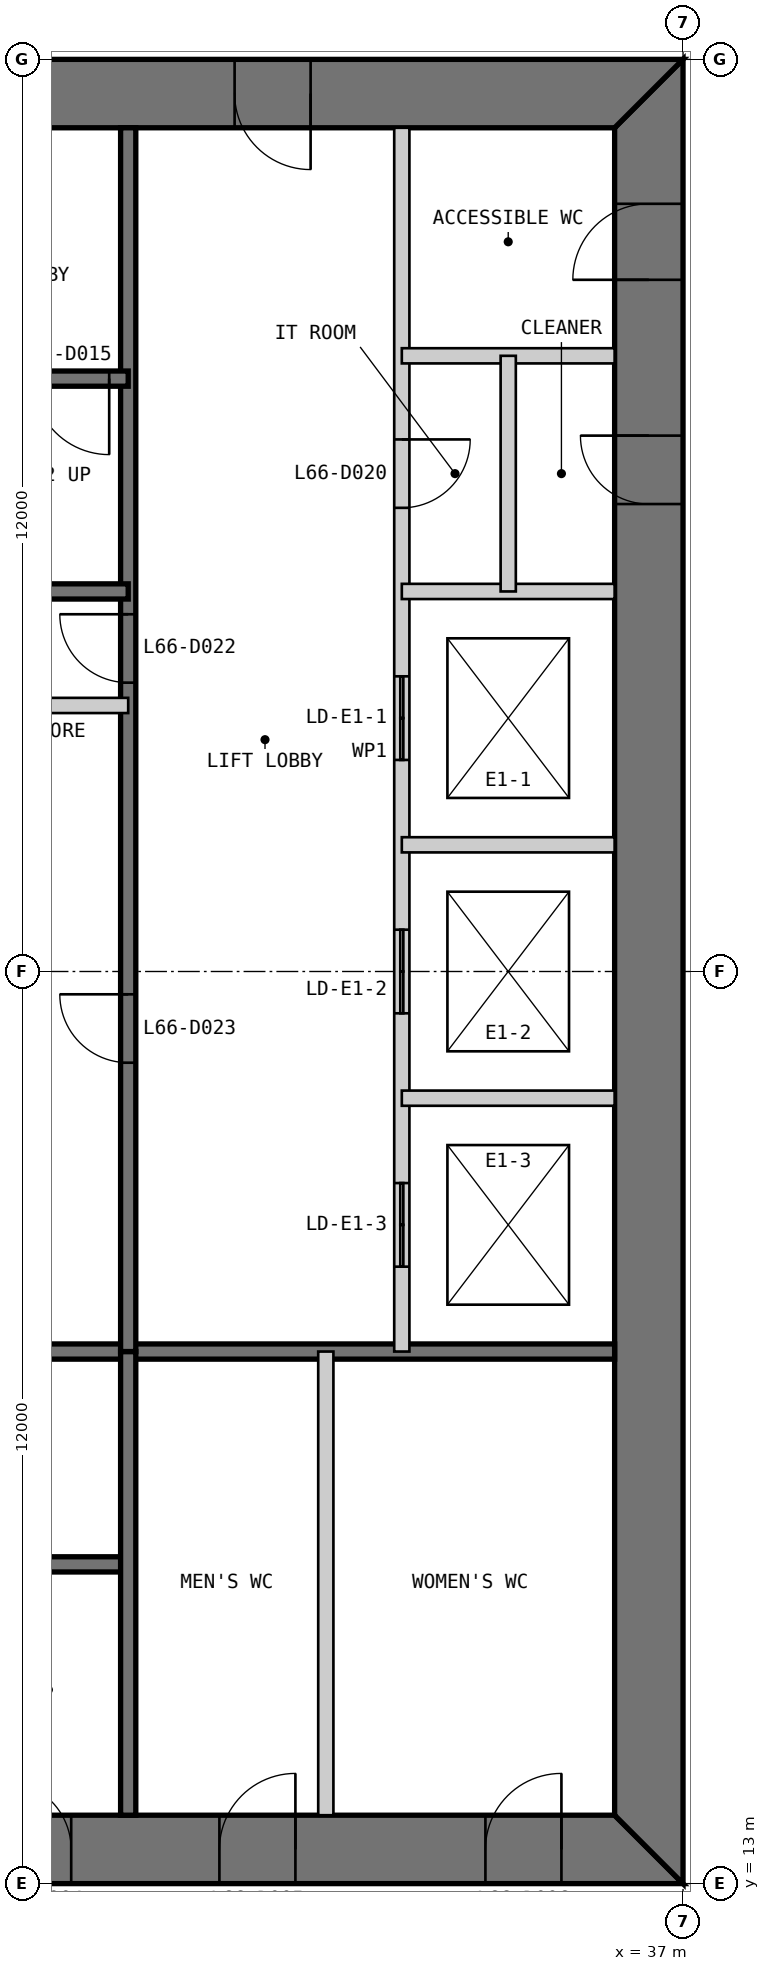
"""IFC4 building model, lengths in metres.
Left out: names, types, materials, properties, quantities, classifications, styles, units other than length and angle.
Written with IfcOpenShell. Run it as: python <this file> out.ifc"""

import sys

from ifc_helpers import new_model, si_unit, direction, frame, frame_2d, origin, place, context, subcontext, project, spatial, polyline, rectangle, outline, extrude, element, fill, save


model = new_model("IFC4")
c1 = context("Model", 3, precision=1e-05, world=origin(), true_north=direction((0.0, 1.0)))
c2 = subcontext(c1, "Body", "Model", "MODEL_VIEW")
j1 = project(units=[si_unit("LENGTHUNIT", "METRE"), si_unit("PLANEANGLEUNIT", "RADIAN")], contexts=[c1])
p1 = place(None, origin())
s1 = spatial("IfcSite", under=j1, at=p1, CompositionType="ELEMENT")
p2 = place(p1, origin())
s2 = spatial("IfcBuilding", under=s1, at=p2, CompositionType="ELEMENT")
p3 = place(p2, frame((0.0, 0.0, 276.4)))
s3 = spatial("IfcBuildingStorey", under=s2, at=p3, CompositionType="ELEMENT", Elevation=276.4)
p4 = place(p3, frame((13.0, 13.45, 0.0), z_axis=(0.0, 0.0, 1.0), x_axis=(1.0, 0.0, 0.0)))
e1 = element("IfcWall", 1, at=p4, inside=s3, PredefinedType="SHEAR", context=c2, shape_type="SweptSolid", body=[
    extrude(outline(polyline([(0.0, -0.45), (24.0, -0.45), (23.1, 0.45), (0.9, 0.45), (0.0, -0.45)])), origin(), (0.0, 0.0, 1.0), 3.4),
])
p5 = place(p4, frame((4.9, 0.0, 0.0)))
e2 = element("IfcOpeningElement", 2, at=p5, cuts=e1, PredefinedType="OPENING", context=c2, shape_type="SweptSolid", body=[
    extrude(rectangle(XDim=1.0, YDim=2.2, at=frame_2d((0.5, 1.1))), frame((0.0, 0.46, 0.0), z_axis=(0.0, -1.0, 0.0), x_axis=(1.0, 0.0, 0.0)), (0.0, 0.0, 1.0), 0.92),
])
p6 = place(p4, frame((8.9, 0.0, 0.0)))
e3 = element("IfcOpeningElement", 3, at=p6, cuts=e1, PredefinedType="OPENING", context=c2, shape_type="SweptSolid", body=[
    extrude(rectangle(XDim=1.1, YDim=2.2, at=frame_2d((0.55, 1.1))), frame((0.0, 0.46, 0.0), z_axis=(0.0, -1.0, 0.0), x_axis=(1.0, 0.0, 0.0)), (0.0, 0.0, 1.0), 0.92),
])
p7 = place(p4, frame((15.05, 0.0, 0.0)))
e4 = element("IfcOpeningElement", 4, at=p7, cuts=e1, PredefinedType="OPENING", context=c2, shape_type="SweptSolid", body=[
    extrude(rectangle(XDim=0.9, YDim=2.2, at=frame_2d((0.45, 1.1))), frame((0.0, 0.46, 0.0), z_axis=(0.0, -1.0, 0.0), x_axis=(1.0, 0.0, 0.0)), (0.0, 0.0, 1.0), 0.92),
])
p8 = place(p4, frame((17.9, 0.0, 0.0)))
e5 = element("IfcOpeningElement", 5, at=p8, cuts=e1, PredefinedType="OPENING", context=c2, shape_type="SweptSolid", body=[
    extrude(rectangle(XDim=1.0, YDim=2.2, at=frame_2d((0.5, 1.1))), frame((0.0, 0.46, 0.0), z_axis=(0.0, -1.0, 0.0), x_axis=(1.0, 0.0, 0.0)), (0.0, 0.0, 1.0), 0.92),
])
p9 = place(p4, frame((21.4, 0.0, 0.0)))
e6 = element("IfcOpeningElement", 6, at=p9, cuts=e1, PredefinedType="OPENING", context=c2, shape_type="SweptSolid", body=[
    extrude(rectangle(XDim=1.0, YDim=2.2, at=frame_2d((0.5, 1.1))), frame((0.0, 0.46, 0.0), z_axis=(0.0, -1.0, 0.0), x_axis=(1.0, 0.0, 0.0)), (0.0, 0.0, 1.0), 0.92),
])
p10 = place(p3, frame((36.55, 13.9, 0.0), z_axis=(0.0, 0.0, 1.0), x_axis=(0.0, 1.0, 0.0)))
e7 = element("IfcWall", 7, at=p10, inside=s3, PredefinedType="SHEAR", context=c2, shape_type="SweptSolid", body=[
    extrude(outline(polyline([(-0.9, -0.45), (23.1, -0.45), (22.2, 0.45), (0.0, 0.45), (-0.9, -0.45)])), origin(), (0.0, 0.0, 1.0), 3.4),
])
p11 = place(p10, frame((20.2, 0.0, 0.0)))
e8 = element("IfcOpeningElement", 8, at=p11, cuts=e7, PredefinedType="OPENING", context=c2, shape_type="SweptSolid", body=[
    extrude(rectangle(XDim=1.0, YDim=2.2, at=frame_2d((0.5, 1.1))), frame((0.0, 0.46, 0.0), z_axis=(0.0, -1.0, 0.0), x_axis=(1.0, 0.0, 0.0)), (0.0, 0.0, 1.0), 0.92),
])
p12 = place(p10, frame((17.25, 0.0, 0.0)))
e9 = element("IfcOpeningElement", 9, at=p12, cuts=e7, PredefinedType="OPENING", context=c2, shape_type="SweptSolid", body=[
    extrude(rectangle(XDim=0.9, YDim=2.2, at=frame_2d((0.45, 1.1))), frame((0.0, 0.46, 0.0), z_axis=(0.0, -1.0, 0.0), x_axis=(1.0, 0.0, 0.0)), (0.0, 0.0, 1.0), 0.92),
])
p13 = place(p3, frame((37.0, 36.55, 0.0), z_axis=(0.0, 0.0, 1.0), x_axis=(-1.0, 0.0, 0.0)))
e10 = element("IfcWall", 10, at=p13, inside=s3, PredefinedType="SHEAR", context=c2, shape_type="SweptSolid", body=[
    extrude(outline(polyline([(0.0, -0.45), (24.0, -0.45), (23.1, 0.45), (0.9, 0.45), (0.0, -0.45)])), origin(), (0.0, 0.0, 1.0), 3.4),
])
p14 = place(p13, frame((4.9, 0.0, 0.0)))
e11 = element("IfcOpeningElement", 11, at=p14, cuts=e10, PredefinedType="OPENING", context=c2, shape_type="SweptSolid", body=[
    extrude(rectangle(XDim=1.0, YDim=2.2, at=frame_2d((0.5, 1.1))), frame((0.0, 0.46, 0.0), z_axis=(0.0, -1.0, 0.0), x_axis=(1.0, 0.0, 0.0)), (0.0, 0.0, 1.0), 0.92),
])
p15 = place(p13, frame((8.9, 0.0, 0.0)))
e12 = element("IfcOpeningElement", 12, at=p15, cuts=e10, PredefinedType="OPENING", context=c2, shape_type="SweptSolid", body=[
    extrude(rectangle(XDim=1.1, YDim=2.2, at=frame_2d((0.55, 1.1))), frame((0.0, 0.46, 0.0), z_axis=(0.0, -1.0, 0.0), x_axis=(1.0, 0.0, 0.0)), (0.0, 0.0, 1.0), 0.92),
])
p16 = place(p13, frame((15.05, 0.0, 0.0)))
e13 = element("IfcOpeningElement", 13, at=p16, cuts=e10, PredefinedType="OPENING", context=c2, shape_type="SweptSolid", body=[
    extrude(rectangle(XDim=0.9, YDim=2.2, at=frame_2d((0.45, 1.1))), frame((0.0, 0.46, 0.0), z_axis=(0.0, -1.0, 0.0), x_axis=(1.0, 0.0, 0.0)), (0.0, 0.0, 1.0), 0.92),
])
p17 = place(p13, frame((17.9, 0.0, 0.0)))
e14 = element("IfcOpeningElement", 14, at=p17, cuts=e10, PredefinedType="OPENING", context=c2, shape_type="SweptSolid", body=[
    extrude(rectangle(XDim=1.0, YDim=2.2, at=frame_2d((0.5, 1.1))), frame((0.0, 0.46, 0.0), z_axis=(0.0, -1.0, 0.0), x_axis=(1.0, 0.0, 0.0)), (0.0, 0.0, 1.0), 0.92),
])
p18 = place(p13, frame((21.4, 0.0, 0.0)))
e15 = element("IfcOpeningElement", 15, at=p18, cuts=e10, PredefinedType="OPENING", context=c2, shape_type="SweptSolid", body=[
    extrude(rectangle(XDim=1.0, YDim=2.2, at=frame_2d((0.5, 1.1))), frame((0.0, 0.46, 0.0), z_axis=(0.0, -1.0, 0.0), x_axis=(1.0, 0.0, 0.0)), (0.0, 0.0, 1.0), 0.92),
])
p19 = place(p3, frame((20.3, 17.2, 0.0), z_axis=(0.0, 0.0, 1.0), x_axis=(1.0, 0.0, 0.0)))
e16 = element("IfcWall", 16, at=p19, inside=s3, PredefinedType="SOLIDWALL", context=c2, shape_type="SweptSolid", body=[
    extrude(rectangle(XDim=9.4, YDim=0.2, at=frame_2d((4.7, 0.0))), origin(), (0.0, 0.0, 1.0), 3.2),
])
p20 = place(p19, frame((0.25, 0.0, 0.0)))
e17 = element("IfcOpeningElement", 17, at=p20, cuts=e16, PredefinedType="OPENING", context=c2, shape_type="SweptSolid", body=[
    extrude(rectangle(XDim=1.0, YDim=2.2, at=frame_2d((0.5, 1.1))), frame((0.0, 0.11, 0.0), z_axis=(0.0, -1.0, 0.0), x_axis=(1.0, 0.0, 0.0)), (0.0, 0.0, 1.0), 0.22),
])
p21 = place(p3, frame((20.3, 20.0, 0.0), z_axis=(0.0, 0.0, 1.0), x_axis=(1.0, 0.0, 0.0)))
e18 = element("IfcWall", 18, at=p21, inside=s3, PredefinedType="SOLIDWALL", context=c2, shape_type="SweptSolid", body=[
    extrude(rectangle(XDim=15.8, YDim=0.2, at=frame_2d((7.9, 0.0))), origin(), (0.0, 0.0, 1.0), 3.2),
])
p22 = place(p3, frame((29.7, 13.9, 0.0), z_axis=(0.0, 0.0, 1.0), x_axis=(0.0, 1.0, 0.0)))
e19 = element("IfcWall", 19, at=p22, inside=s3, PredefinedType="SOLIDWALL", context=c2, shape_type="SweptSolid", body=[
    extrude(rectangle(XDim=6.1, YDim=0.2, at=frame_2d((3.05, 0.0))), origin(), (0.0, 0.0, 1.0), 3.2),
])
p23 = place(p3, frame((32.3, 13.9, 0.0), z_axis=(0.0, 0.0, 1.0), x_axis=(0.0, 1.0, 0.0)))
e20 = element("IfcWall", 20, at=p23, inside=s3, PredefinedType="PARTITIONING", context=c2, shape_type="SweptSolid", body=[
    extrude(rectangle(XDim=6.1, YDim=0.2, at=frame_2d((3.05, 0.0))), origin(), (0.0, 0.0, 1.0), 3.2),
])
p24 = place(p3, frame((33.3, 36.1, 0.0), z_axis=(0.0, 0.0, 1.0), x_axis=(0.0, -1.0, 0.0)))
e21 = element("IfcWall", 21, at=p24, inside=s3, PredefinedType="PARTITIONING", context=c2, shape_type="SweptSolid", body=[
    extrude(rectangle(XDim=16.1, YDim=0.2, at=frame_2d((8.05, 0.0))), origin(), (0.0, 0.0, 1.0), 3.2),
])
p25 = place(p24, frame((4.1, 0.0, 0.0)))
e22 = element("IfcOpeningElement", 22, at=p25, cuts=e21, PredefinedType="OPENING", context=c2, shape_type="SweptSolid", body=[
    extrude(rectangle(XDim=0.9, YDim=2.2, at=frame_2d((0.45, 1.1))), frame((0.0, 0.11, 0.0), z_axis=(0.0, -1.0, 0.0), x_axis=(1.0, 0.0, 0.0)), (0.0, 0.0, 1.0), 0.22),
])
p26 = place(p24, frame((7.217, 0.0, 0.0)))
e23 = element("IfcOpeningElement", 23, at=p26, cuts=e21, PredefinedType="OPENING", context=c2, shape_type="SweptSolid", body=[
    extrude(rectangle(XDim=1.1, YDim=2.2, at=frame_2d((0.55, 1.1))), frame((0.0, 0.11, 0.0), z_axis=(0.0, -1.0, 0.0), x_axis=(1.0, 0.0, 0.0)), (0.0, 0.0, 1.0), 0.22),
])
p27 = place(p24, frame((10.55, 0.0, 0.0)))
e24 = element("IfcOpeningElement", 24, at=p27, cuts=e21, PredefinedType="OPENING", context=c2, shape_type="SweptSolid", body=[
    extrude(rectangle(XDim=1.1, YDim=2.2, at=frame_2d((0.55, 1.1))), frame((0.0, 0.11, 0.0), z_axis=(0.0, -1.0, 0.0), x_axis=(1.0, 0.0, 0.0)), (0.0, 0.0, 1.0), 0.22),
])
p28 = place(p24, frame((13.883, 0.0, 0.0)))
e25 = element("IfcOpeningElement", 25, at=p28, cuts=e21, PredefinedType="OPENING", context=c2, shape_type="SweptSolid", body=[
    extrude(rectangle(XDim=1.1, YDim=2.2, at=frame_2d((0.55, 1.1))), frame((0.0, 0.11, 0.0), z_axis=(0.0, -1.0, 0.0), x_axis=(1.0, 0.0, 0.0)), (0.0, 0.0, 1.0), 0.22),
])
p29 = place(p3, frame((29.7, 36.1, 0.0), z_axis=(0.0, 0.0, 1.0), x_axis=(0.0, -1.0, 0.0)))
e26 = element("IfcWall", 26, at=p29, inside=s3, PredefinedType="SOLIDWALL", context=c2, shape_type="SweptSolid", body=[
    extrude(rectangle(XDim=16.1, YDim=0.2, at=frame_2d((8.05, 0.0))), origin(), (0.0, 0.0, 1.0), 3.2),
])
p30 = place(p29, frame((6.4, 0.0, 0.0)))
e27 = element("IfcOpeningElement", 27, at=p30, cuts=e26, PredefinedType="OPENING", context=c2, shape_type="SweptSolid", body=[
    extrude(rectangle(XDim=0.9, YDim=2.2, at=frame_2d((0.45, 1.1))), frame((0.0, 0.11, 0.0), z_axis=(0.0, -1.0, 0.0), x_axis=(1.0, 0.0, 0.0)), (0.0, 0.0, 1.0), 0.22),
])
p31 = place(p29, frame((11.4, 0.0, 0.0)))
e28 = element("IfcOpeningElement", 28, at=p31, cuts=e26, PredefinedType="OPENING", context=c2, shape_type="SweptSolid", body=[
    extrude(rectangle(XDim=0.9, YDim=2.2, at=frame_2d((0.45, 1.1))), frame((0.0, 0.11, 0.0), z_axis=(0.0, -1.0, 0.0), x_axis=(1.0, 0.0, 0.0)), (0.0, 0.0, 1.0), 0.22),
])
for number, where, z_axis, x_axis in (
    (29, (36.1, 30.0, 0.0), (0.0, 0.0, 1.0), (-1.0, 0.0, 0.0)),
    (30, (36.1, 26.667, 0.0), (0.0, 0.0, 1.0), (-1.0, 0.0, 0.0)),
    (31, (36.1, 23.333, 0.0), (0.0, 0.0, 1.0), (-1.0, 0.0, 0.0)),
):
    element("IfcWall", number, at=place(p3, frame(where, z_axis=z_axis, x_axis=x_axis)), inside=s3, PredefinedType="PARTITIONING", context=c2, shape_type="SweptSolid", body=[
        extrude(rectangle(XDim=2.8, YDim=0.2, at=frame_2d((1.4, 0.0))), origin(), (0.0, 0.0, 1.0), 3.2),
    ])
p32 = place(p3, frame((29.7, 32.8, 0.0), z_axis=(0.0, 0.0, 1.0), x_axis=(-1.0, 0.0, 0.0)))
e32 = element("IfcWall", 32, at=p32, inside=s3, PredefinedType="SOLIDWALL", context=c2, shape_type="SweptSolid", body=[
    extrude(rectangle(XDim=9.4, YDim=0.2, at=frame_2d((4.7, 0.0))), origin(), (0.0, 0.0, 1.0), 3.2),
])
p33 = place(p32, frame((0.25, 0.0, 0.0)))
e33 = element("IfcOpeningElement", 33, at=p33, cuts=e32, PredefinedType="OPENING", context=c2, shape_type="SweptSolid", body=[
    extrude(rectangle(XDim=1.0, YDim=2.2, at=frame_2d((0.5, 1.1))), frame((0.0, 0.11, 0.0), z_axis=(0.0, -1.0, 0.0), x_axis=(1.0, 0.0, 0.0)), (0.0, 0.0, 1.0), 0.22),
])
p34 = place(p3, frame((29.7, 30.0, 0.0), z_axis=(0.0, 0.0, 1.0), x_axis=(-1.0, 0.0, 0.0)))
e34 = element("IfcWall", 34, at=p34, inside=s3, PredefinedType="SOLIDWALL", context=c2, shape_type="SweptSolid", body=[
    extrude(rectangle(XDim=15.8, YDim=0.2, at=frame_2d((7.9, 0.0))), origin(), (0.0, 0.0, 1.0), 3.2),
])
p35 = place(p3, frame((36.1, 33.1, 0.0), z_axis=(0.0, 0.0, 1.0), x_axis=(-1.0, 0.0, 0.0)))
e35 = element("IfcWall", 35, at=p35, inside=s3, PredefinedType="PARTITIONING", context=c2, shape_type="SweptSolid", body=[
    extrude(rectangle(XDim=2.8, YDim=0.2, at=frame_2d((1.4, 0.0))), origin(), (0.0, 0.0, 1.0), 3.2),
])
p36 = place(p3, frame((34.7, 33.1, 0.0), z_axis=(0.0, 0.0, 1.0), x_axis=(0.0, -1.0, 0.0)))
e36 = element("IfcWall", 36, at=p36, inside=s3, PredefinedType="PARTITIONING", context=c2, shape_type="SweptSolid", body=[
    extrude(rectangle(XDim=3.1, YDim=0.2, at=frame_2d((1.55, 0.0))), origin(), (0.0, 0.0, 1.0), 3.2),
])
p37 = place(p3, frame((29.7, 28.5, 0.0), z_axis=(0.0, 0.0, 1.0), x_axis=(-1.0, 0.0, 0.0)))
e37 = element("IfcWall", 37, at=p37, inside=s3, PredefinedType="PARTITIONING", context=c2, shape_type="SweptSolid", body=[
    extrude(rectangle(XDim=2.8, YDim=0.2, at=frame_2d((1.4, 0.0))), origin(), (0.0, 0.0, 1.0), 3.2),
])
p38 = place(p7, origin())
e38 = element("IfcDoor", 38, at=p38, inside=s3, OperationType="SINGLE_SWING_LEFT", PredefinedType="DOOR", context=c2, shape_type="SweptSolid", body=[
    extrude(rectangle(XDim=0.9, YDim=2.2, at=frame_2d((0.45, 1.1))), frame((0.0, 0.025, 0.0), z_axis=(0.0, -1.0, 0.0), x_axis=(1.0, 0.0, 0.0)), (0.0, 0.0, 1.0), 0.05),
    extrude(outline(polyline([(0.0, 0.0), (0.04, 0.0), (0.04, 2.16), (0.86, 2.16), (0.86, 0.0), (0.9, 0.0), (0.9, 2.2), (0.0, 2.2), (0.0, 0.0)])), frame((0.0, 0.3, 0.0), z_axis=(0.0, -1.0, 0.0), x_axis=(1.0, 0.0, 0.0)), (0.0, 0.0, 1.0), 0.6),
])
fill(e4, e38)
p39 = place(p8, origin())
e39 = element("IfcDoor", 39, at=p39, inside=s3, OperationType="SINGLE_SWING_RIGHT", PredefinedType="DOOR", context=c2, shape_type="SweptSolid", body=[
    extrude(rectangle(XDim=1.0, YDim=2.2, at=frame_2d((0.5, 1.1))), frame((0.0, 0.025, 0.0), z_axis=(0.0, -1.0, 0.0), x_axis=(1.0, 0.0, 0.0)), (0.0, 0.0, 1.0), 0.05),
    extrude(outline(polyline([(0.0, 0.0), (0.04, 0.0), (0.04, 2.16), (0.96, 2.16), (0.96, 0.0), (1.0, 0.0), (1.0, 2.2), (0.0, 2.2), (0.0, 0.0)])), frame((0.0, 0.3, 0.0), z_axis=(0.0, -1.0, 0.0), x_axis=(1.0, 0.0, 0.0)), (0.0, 0.0, 1.0), 0.6),
])
fill(e5, e39)
p40 = place(p9, origin())
e40 = element("IfcDoor", 40, at=p40, inside=s3, OperationType="SINGLE_SWING_RIGHT", PredefinedType="DOOR", context=c2, shape_type="SweptSolid", body=[
    extrude(rectangle(XDim=1.0, YDim=2.2, at=frame_2d((0.5, 1.1))), frame((0.0, 0.025, 0.0), z_axis=(0.0, -1.0, 0.0), x_axis=(1.0, 0.0, 0.0)), (0.0, 0.0, 1.0), 0.05),
    extrude(outline(polyline([(0.0, 0.0), (0.04, 0.0), (0.04, 2.16), (0.96, 2.16), (0.96, 0.0), (1.0, 0.0), (1.0, 2.2), (0.0, 2.2), (0.0, 0.0)])), frame((0.0, 0.3, 0.0), z_axis=(0.0, -1.0, 0.0), x_axis=(1.0, 0.0, 0.0)), (0.0, 0.0, 1.0), 0.6),
])
fill(e6, e40)
p41 = place(p14, origin())
e41 = element("IfcDoor", 41, at=p41, inside=s3, OperationType="SINGLE_SWING_LEFT", PredefinedType="DOOR", context=c2, shape_type="SweptSolid", body=[
    extrude(rectangle(XDim=1.0, YDim=2.2, at=frame_2d((0.5, 1.1))), frame((0.0, 0.025, 0.0), z_axis=(0.0, -1.0, 0.0), x_axis=(1.0, 0.0, 0.0)), (0.0, 0.0, 1.0), 0.05),
    extrude(outline(polyline([(0.0, 0.0), (0.04, 0.0), (0.04, 2.16), (0.96, 2.16), (0.96, 0.0), (1.0, 0.0), (1.0, 2.2), (0.0, 2.2), (0.0, 0.0)])), frame((0.0, 0.3, 0.0), z_axis=(0.0, -1.0, 0.0), x_axis=(1.0, 0.0, 0.0)), (0.0, 0.0, 1.0), 0.6),
])
fill(e11, e41)
p42 = place(p33, origin())
e42 = element("IfcDoor", 42, at=p42, inside=s3, OperationType="SINGLE_SWING_LEFT", PredefinedType="DOOR", context=c2, shape_type="SweptSolid", body=[
    extrude(rectangle(XDim=1.0, YDim=2.2, at=frame_2d((0.5, 1.1))), frame((0.0, 0.025, 0.0), z_axis=(0.0, -1.0, 0.0), x_axis=(1.0, 0.0, 0.0)), (0.0, 0.0, 1.0), 0.05),
])
fill(e33, e42)
p43 = place(p11, origin())
e43 = element("IfcDoor", 43, at=p43, inside=s3, OperationType="SINGLE_SWING_LEFT", PredefinedType="DOOR", context=c2, shape_type="SweptSolid", body=[
    extrude(rectangle(XDim=1.0, YDim=2.2, at=frame_2d((0.5, 1.1))), frame((0.0, 0.025, 0.0), z_axis=(0.0, -1.0, 0.0), x_axis=(1.0, 0.0, 0.0)), (0.0, 0.0, 1.0), 0.05),
    extrude(outline(polyline([(0.0, 0.0), (0.04, 0.0), (0.04, 2.16), (0.96, 2.16), (0.96, 0.0), (1.0, 0.0), (1.0, 2.2), (0.0, 2.2), (0.0, 0.0)])), frame((0.0, 0.3, 0.0), z_axis=(0.0, -1.0, 0.0), x_axis=(1.0, 0.0, 0.0)), (0.0, 0.0, 1.0), 0.6),
])
fill(e8, e43)
p44 = place(p25, origin())
e44 = element("IfcDoor", 44, at=p44, inside=s3, OperationType="SINGLE_SWING_LEFT", PredefinedType="DOOR", context=c2, shape_type="SweptSolid", body=[
    extrude(rectangle(XDim=0.9, YDim=2.2, at=frame_2d((0.45, 1.1))), frame((0.0, 0.025, 0.0), z_axis=(0.0, -1.0, 0.0), x_axis=(1.0, 0.0, 0.0)), (0.0, 0.0, 1.0), 0.05),
])
fill(e22, e44)
p45 = place(p12, origin())
e45 = element("IfcDoor", 45, at=p45, inside=s3, OperationType="SINGLE_SWING_RIGHT", PredefinedType="DOOR", context=c2, shape_type="SweptSolid", body=[
    extrude(rectangle(XDim=0.9, YDim=2.2, at=frame_2d((0.45, 1.1))), frame((0.0, 0.025, 0.0), z_axis=(0.0, -1.0, 0.0), x_axis=(1.0, 0.0, 0.0)), (0.0, 0.0, 1.0), 0.05),
    extrude(outline(polyline([(0.0, 0.0), (0.04, 0.0), (0.04, 2.16), (0.86, 2.16), (0.86, 0.0), (0.9, 0.0), (0.9, 2.2), (0.0, 2.2), (0.0, 0.0)])), frame((0.0, 0.3, 0.0), z_axis=(0.0, -1.0, 0.0), x_axis=(1.0, 0.0, 0.0)), (0.0, 0.0, 1.0), 0.6),
])
fill(e9, e45)
p46 = place(p30, frame((0.9, 0.0, 0.0), z_axis=(0.0, 0.0, 1.0), x_axis=(-1.0, 0.0, 0.0)))
e46 = element("IfcDoor", 46, at=p46, inside=s3, OperationType="SINGLE_SWING_RIGHT", PredefinedType="DOOR", context=c2, shape_type="SweptSolid", body=[
    extrude(rectangle(XDim=0.9, YDim=2.2, at=frame_2d((0.45, 1.1))), frame((0.0, 0.025, 0.0), z_axis=(0.0, -1.0, 0.0), x_axis=(1.0, 0.0, 0.0)), (0.0, 0.0, 1.0), 0.05),
])
fill(e27, e46)
p47 = place(p31, frame((0.9, 0.0, 0.0), z_axis=(0.0, 0.0, 1.0), x_axis=(-1.0, 0.0, 0.0)))
e47 = element("IfcDoor", 47, at=p47, inside=s3, OperationType="SINGLE_SWING_RIGHT", PredefinedType="DOOR", context=c2, shape_type="SweptSolid", body=[
    extrude(rectangle(XDim=0.9, YDim=2.2, at=frame_2d((0.45, 1.1))), frame((0.0, 0.025, 0.0), z_axis=(0.0, -1.0, 0.0), x_axis=(1.0, 0.0, 0.0)), (0.0, 0.0, 1.0), 0.05),
])
fill(e28, e47)
p48 = place(p26, origin())
e48 = element("IfcDoor", 48, at=p48, inside=s3, OperationType="DOUBLE_DOOR_SLIDING", PredefinedType="DOOR", context=c2, shape_type="SweptSolid", body=[
    extrude(rectangle(XDim=1.1, YDim=2.2, at=frame_2d((0.55, 1.1))), frame((0.0, 0.025, 0.0), z_axis=(0.0, -1.0, 0.0), x_axis=(1.0, 0.0, 0.0)), (0.0, 0.0, 1.0), 0.05),
])
fill(e23, e48)
p49 = place(p27, origin())
e49 = element("IfcDoor", 49, at=p49, inside=s3, OperationType="DOUBLE_DOOR_SLIDING", PredefinedType="DOOR", context=c2, shape_type="SweptSolid", body=[
    extrude(rectangle(XDim=1.1, YDim=2.2, at=frame_2d((0.55, 1.1))), frame((0.0, 0.025, 0.0), z_axis=(0.0, -1.0, 0.0), x_axis=(1.0, 0.0, 0.0)), (0.0, 0.0, 1.0), 0.05),
])
fill(e24, e49)
p50 = place(p28, origin())
e50 = element("IfcDoor", 50, at=p50, inside=s3, OperationType="DOUBLE_DOOR_SLIDING", PredefinedType="DOOR", context=c2, shape_type="SweptSolid", body=[
    extrude(rectangle(XDim=1.1, YDim=2.2, at=frame_2d((0.55, 1.1))), frame((0.0, 0.025, 0.0), z_axis=(0.0, -1.0, 0.0), x_axis=(1.0, 0.0, 0.0)), (0.0, 0.0, 1.0), 0.05),
])
fill(e25, e50)
save(model, sys.argv[1])
